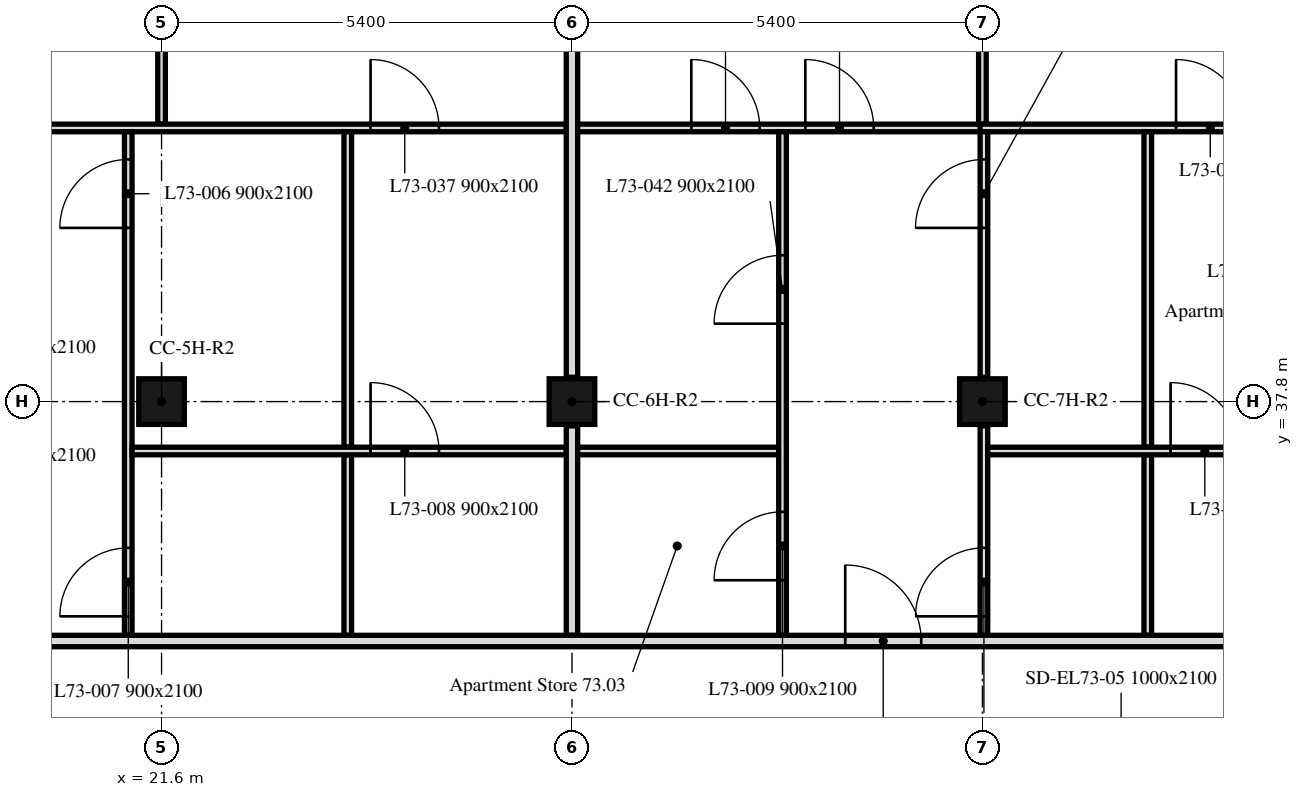
"""IFC4 building model, lengths in metres.
Left out: names, types, materials, properties, quantities, classifications, styles, units other than length and angle.
Written with IfcOpenShell. Run it as: python <this file> out.ifc"""

import sys

from ifc_helpers import new_model, si_unit, direction, frame, frame_2d, origin, origin_2d, place, context, subcontext, project, spatial, rectangle, extrude, element, fill, save


model = new_model("IFC4")
c1 = context("Model", 3, precision=1e-05, world=origin(), true_north=direction((0.0, 1.0)))
c2 = subcontext(c1, "Body", "Model", "MODEL_VIEW")
j1 = project(units=[si_unit("LENGTHUNIT", "METRE"), si_unit("PLANEANGLEUNIT", "RADIAN")], contexts=[c1])
p1 = place(None, origin())
s1 = spatial("IfcSite", under=j1, at=p1, CompositionType="ELEMENT")
p2 = place(p1, origin())
s2 = spatial("IfcBuilding", under=s1, at=p2, CompositionType="ELEMENT")
p3 = place(p2, frame((0.0, 0.0, 295.0)))
s3 = spatial("IfcBuildingStorey", under=s2, at=p3, CompositionType="ELEMENT", Elevation=295.0)
for number, where, z_axis, x_axis in (
    (1, (21.6, 37.8, 0.0), (0.0, 0.0, 1.0), (1.0, 0.0, 0.0)),
    (2, (27.0, 37.8, 0.0), (0.0, 0.0, 1.0), (1.0, 0.0, 0.0)),
    (3, (32.4, 37.8, 0.0), (0.0, 0.0, 1.0), (1.0, 0.0, 0.0)),
):
    element("IfcColumn", number, at=place(p3, frame(where, z_axis=z_axis, x_axis=x_axis)), inside=s3, PredefinedType="COLUMN", context=c2, shape_type="SweptSolid", body=[
        extrude(rectangle(XDim=0.6, YDim=0.6, at=origin_2d()), origin(), (0.0, 0.0, 1.0), 3.0),
    ])
p4 = place(p3, frame((21.6, 41.45, 0.0), z_axis=(0.0, 0.0, 1.0), x_axis=(0.0, 1.0, 0.0)))
e4 = element("IfcWall", 4, at=p4, inside=s3, PredefinedType="PARTITIONING", context=c2, shape_type="SweptSolid", body=[
    extrude(rectangle(XDim=1.43, YDim=0.1, at=frame_2d((0.715, 0.0))), origin(), (0.0, 0.0, 1.0), 2.4),
])
p5 = place(p3, frame((16.275, 41.4, 0.0), z_axis=(0.0, 0.0, 1.0), x_axis=(1.0, 0.0, 0.0)))
e5 = element("IfcWall", 5, at=p5, inside=s3, PredefinedType="PARTITIONING", context=c2, shape_type="SweptSolid", body=[
    extrude(rectangle(XDim=10.65, YDim=0.1, at=frame_2d((5.325, 0.0))), origin(), (0.0, 0.0, 1.0), 2.4),
])
p6 = place(p5, frame((0.937, 0.0, 0.0)))
e6 = element("IfcOpeningElement", 6, at=p6, cuts=e5, PredefinedType="OPENING", context=c2, shape_type="SweptSolid", body=[
    extrude(rectangle(XDim=0.9, YDim=2.1, at=frame_2d((0.45, 1.05))), frame((0.0, 0.05, 0.0), z_axis=(0.0, -1.0, 0.0), x_axis=(1.0, 0.0, 0.0)), (0.0, 0.0, 1.0), 0.1),
])
p7 = place(p5, frame((8.075, 0.0, 0.0)))
e7 = element("IfcOpeningElement", 7, at=p7, cuts=e5, PredefinedType="OPENING", context=c2, shape_type="SweptSolid", body=[
    extrude(rectangle(XDim=0.9, YDim=2.1, at=frame_2d((0.45, 1.05))), frame((0.0, 0.05, 0.0), z_axis=(0.0, -1.0, 0.0), x_axis=(1.0, 0.0, 0.0)), (0.0, 0.0, 1.0), 0.1),
])
p8 = place(p5, frame((2.437, 0.0, 0.0)))
e8 = element("IfcOpeningElement", 8, at=p8, cuts=e5, PredefinedType="OPENING", context=c2, shape_type="SweptSolid", body=[
    extrude(rectangle(XDim=0.9, YDim=2.1, at=frame_2d((0.45, 1.05))), frame((0.0, 0.05, 0.0), z_axis=(0.0, -1.0, 0.0), x_axis=(1.0, 0.0, 0.0)), (0.0, 0.0, 1.0), 0.1),
])
p9 = place(p3, frame((21.162, 34.725, 0.0), z_axis=(0.0, 0.0, 1.0), x_axis=(0.0, 1.0, 0.0)))
e9 = element("IfcWall", 9, at=p9, inside=s3, PredefinedType="PARTITIONING", context=c2, shape_type="SweptSolid", body=[
    extrude(rectangle(XDim=6.625, YDim=0.1, at=frame_2d((3.312, 0.0))), origin(), (0.0, 0.0, 1.0), 3.0),
])
p10 = place(p9, frame((5.36, 0.0, 0.0)))
e10 = element("IfcOpeningElement", 10, at=p10, cuts=e9, PredefinedType="OPENING", context=c2, shape_type="SweptSolid", body=[
    extrude(rectangle(XDim=0.9, YDim=2.1, at=frame_2d((0.45, 1.05))), frame((0.0, 0.05, 0.0), z_axis=(0.0, -1.0, 0.0), x_axis=(1.0, 0.0, 0.0)), (0.0, 0.0, 1.0), 0.1),
])
p11 = place(p9, frame((0.25, 0.0, 0.0)))
e11 = element("IfcOpeningElement", 11, at=p11, cuts=e9, PredefinedType="OPENING", context=c2, shape_type="SweptSolid", body=[
    extrude(rectangle(XDim=0.9, YDim=2.1, at=frame_2d((0.45, 1.05))), frame((0.0, 0.05, 0.0), z_axis=(0.0, -1.0, 0.0), x_axis=(1.0, 0.0, 0.0)), (0.0, 0.0, 1.0), 0.1),
])
p12 = place(p3, frame((24.05, 37.2, 0.0), z_axis=(0.0, 0.0, 1.0), x_axis=(0.0, 1.0, 0.0)))
e12 = element("IfcWall", 12, at=p12, inside=s3, PredefinedType="PARTITIONING", context=c2, shape_type="SweptSolid", body=[
    extrude(rectangle(XDim=4.15, YDim=0.1, at=frame_2d((2.075, 0.0))), origin(), (0.0, 0.0, 1.0), 3.0),
])
p13 = place(p3, frame((24.05, 34.725, 0.0), z_axis=(0.0, 0.0, 1.0), x_axis=(0.0, 1.0, 0.0)))
e13 = element("IfcWall", 13, at=p13, inside=s3, PredefinedType="PARTITIONING", context=c2, shape_type="SweptSolid", body=[
    extrude(rectangle(XDim=2.375, YDim=0.1, at=frame_2d((1.188, 0.0))), origin(), (0.0, 0.0, 1.0), 3.0),
])
p14 = place(p3, frame((21.212, 37.15, 0.0), z_axis=(0.0, 0.0, 1.0), x_axis=(1.0, 0.0, 0.0)))
e14 = element("IfcWall", 14, at=p14, inside=s3, PredefinedType="PARTITIONING", context=c2, shape_type="SweptSolid", body=[
    extrude(rectangle(XDim=5.713, YDim=0.1, at=frame_2d((2.856, 0.0))), origin(), (0.0, 0.0, 1.0), 2.4),
])
p15 = place(p14, frame((3.138, 0.0, 0.0)))
e15 = element("IfcOpeningElement", 15, at=p15, cuts=e14, PredefinedType="OPENING", context=c2, shape_type="SweptSolid", body=[
    extrude(rectangle(XDim=0.9, YDim=2.1, at=frame_2d((0.45, 1.05))), frame((0.0, 0.05, 0.0), z_axis=(0.0, -1.0, 0.0), x_axis=(1.0, 0.0, 0.0)), (0.0, 0.0, 1.0), 0.1),
])
p16 = place(p3, frame((27.0, 38.12, 0.0), z_axis=(0.0, 0.0, 1.0), x_axis=(0.0, 1.0, 0.0)))
e16 = element("IfcWall", 16, at=p16, inside=s3, PredefinedType="PARTITIONING", context=c2, shape_type="SweptSolid", body=[
    extrude(rectangle(XDim=4.76, YDim=0.15, at=frame_2d((2.38, 0.0))), origin(), (0.0, 0.0, 1.0), 2.4),
])
p17 = place(p3, frame((27.0, 34.725, 0.0), z_axis=(0.0, 0.0, 1.0), x_axis=(0.0, 1.0, 0.0)))
e17 = element("IfcWall", 17, at=p17, inside=s3, PredefinedType="PARTITIONING", context=c2, shape_type="SweptSolid", body=[
    extrude(rectangle(XDim=2.755, YDim=0.15, at=frame_2d((1.377, 0.0))), origin(), (0.0, 0.0, 1.0), 2.4),
])
p18 = place(p3, frame((27.075, 41.4, 0.0), z_axis=(0.0, 0.0, 1.0), x_axis=(1.0, 0.0, 0.0)))
e18 = element("IfcWall", 18, at=p18, inside=s3, PredefinedType="PARTITIONING", context=c2, shape_type="SweptSolid", body=[
    extrude(rectangle(XDim=5.375, YDim=0.1, at=frame_2d((2.688, 0.0))), origin(), (0.0, 0.0, 1.0), 3.0),
])
p19 = place(p18, frame((1.495, 0.0, 0.0)))
e19 = element("IfcOpeningElement", 19, at=p19, cuts=e18, PredefinedType="OPENING", context=c2, shape_type="SweptSolid", body=[
    extrude(rectangle(XDim=0.9, YDim=2.1, at=frame_2d((0.45, 1.05))), frame((0.0, 0.05, 0.0), z_axis=(0.0, -1.0, 0.0), x_axis=(1.0, 0.0, 0.0)), (0.0, 0.0, 1.0), 0.1),
])
p20 = place(p18, frame((2.995, 0.0, 0.0)))
e20 = element("IfcOpeningElement", 20, at=p20, cuts=e18, PredefinedType="OPENING", context=c2, shape_type="SweptSolid", body=[
    extrude(rectangle(XDim=0.9, YDim=2.1, at=frame_2d((0.45, 1.05))), frame((0.0, 0.05, 0.0), z_axis=(0.0, -1.0, 0.0), x_axis=(1.0, 0.0, 0.0)), (0.0, 0.0, 1.0), 0.1),
])
p21 = place(p3, frame((32.4, 41.45, 0.0), z_axis=(0.0, 0.0, 1.0), x_axis=(0.0, 1.0, 0.0)))
e21 = element("IfcWall", 21, at=p21, inside=s3, PredefinedType="PARTITIONING", context=c2, shape_type="SweptSolid", body=[
    extrude(rectangle(XDim=1.43, YDim=0.1, at=frame_2d((0.715, 0.0))), origin(), (0.0, 0.0, 1.0), 2.4),
])
p22 = place(p3, frame((32.37, 41.4, 0.0), z_axis=(0.0, 0.0, 1.0), x_axis=(1.0, 0.0, 0.0)))
e22 = element("IfcWall", 22, at=p22, inside=s3, PredefinedType="PARTITIONING", context=c2, shape_type="SweptSolid", body=[
    extrude(rectangle(XDim=5.355, YDim=0.1, at=frame_2d((2.677, 0.0))), origin(), (0.0, 0.0, 1.0), 3.0),
])
p23 = place(p22, frame((2.578, 0.0, 0.0)))
e23 = element("IfcOpeningElement", 23, at=p23, cuts=e22, PredefinedType="OPENING", context=c2, shape_type="SweptSolid", body=[
    extrude(rectangle(XDim=0.9, YDim=2.1, at=frame_2d((0.45, 1.05))), frame((0.0, 0.05, 0.0), z_axis=(0.0, -1.0, 0.0), x_axis=(1.0, 0.0, 0.0)), (0.0, 0.0, 1.0), 0.1),
])
p24 = place(p3, frame((27.075, 37.15, 0.0), z_axis=(0.0, 0.0, 1.0), x_axis=(1.0, 0.0, 0.0)))
e24 = element("IfcWall", 24, at=p24, inside=s3, PredefinedType="PARTITIONING", context=c2, shape_type="SweptSolid", body=[
    extrude(rectangle(XDim=2.645, YDim=0.1, at=frame_2d((1.323, 0.0))), origin(), (0.0, 0.0, 1.0), 3.0),
])
p25 = place(p3, frame((29.77, 34.725, 0.0), z_axis=(0.0, 0.0, 1.0), x_axis=(0.0, 1.0, 0.0)))
e25 = element("IfcWall", 25, at=p25, inside=s3, PredefinedType="PARTITIONING", context=c2, shape_type="SweptSolid", body=[
    extrude(rectangle(XDim=6.625, YDim=0.1, at=frame_2d((3.312, 0.0))), origin(), (0.0, 0.0, 1.0), 3.0),
])
p26 = place(p25, frame((0.725, 0.0, 0.0)))
e26 = element("IfcOpeningElement", 26, at=p26, cuts=e25, PredefinedType="OPENING", context=c2, shape_type="SweptSolid", body=[
    extrude(rectangle(XDim=0.9, YDim=2.1, at=frame_2d((0.45, 1.05))), frame((0.0, 0.05, 0.0), z_axis=(0.0, -1.0, 0.0), x_axis=(1.0, 0.0, 0.0)), (0.0, 0.0, 1.0), 0.1),
])
p27 = place(p25, frame((4.1, 0.0, 0.0)))
e27 = element("IfcOpeningElement", 27, at=p27, cuts=e25, PredefinedType="OPENING", context=c2, shape_type="SweptSolid", body=[
    extrude(rectangle(XDim=0.9, YDim=2.1, at=frame_2d((0.45, 1.05))), frame((0.0, 0.05, 0.0), z_axis=(0.0, -1.0, 0.0), x_axis=(1.0, 0.0, 0.0)), (0.0, 0.0, 1.0), 0.1),
])
p28 = place(p3, frame((32.42, 34.725, 0.0), z_axis=(0.0, 0.0, 1.0), x_axis=(0.0, 1.0, 0.0)))
e28 = element("IfcWall", 28, at=p28, inside=s3, PredefinedType="PARTITIONING", context=c2, shape_type="SweptSolid", body=[
    extrude(rectangle(XDim=2.755, YDim=0.1, at=frame_2d((1.377, 0.0))), origin(), (0.0, 0.0, 1.0), 2.4),
])
p29 = place(p28, frame((0.25, 0.0, 0.0)))
e29 = element("IfcOpeningElement", 29, at=p29, cuts=e28, PredefinedType="OPENING", context=c2, shape_type="SweptSolid", body=[
    extrude(rectangle(XDim=0.9, YDim=2.1, at=frame_2d((0.45, 1.05))), frame((0.0, 0.05, 0.0), z_axis=(0.0, -1.0, 0.0), x_axis=(1.0, 0.0, 0.0)), (0.0, 0.0, 1.0), 0.1),
])
p30 = place(p3, frame((32.42, 38.12, 0.0), z_axis=(0.0, 0.0, 1.0), x_axis=(0.0, 1.0, 0.0)))
e30 = element("IfcWall", 30, at=p30, inside=s3, PredefinedType="PARTITIONING", context=c2, shape_type="SweptSolid", body=[
    extrude(rectangle(XDim=3.23, YDim=0.1, at=frame_2d((1.615, 0.0))), origin(), (0.0, 0.0, 1.0), 2.4),
])
p31 = place(p30, frame((1.965, 0.0, 0.0)))
e31 = element("IfcOpeningElement", 31, at=p31, cuts=e30, PredefinedType="OPENING", context=c2, shape_type="SweptSolid", body=[
    extrude(rectangle(XDim=0.9, YDim=2.1, at=frame_2d((0.45, 1.05))), frame((0.0, 0.05, 0.0), z_axis=(0.0, -1.0, 0.0), x_axis=(1.0, 0.0, 0.0)), (0.0, 0.0, 1.0), 0.1),
])
p32 = place(p3, frame((34.576, 37.2, 0.0), z_axis=(0.0, 0.0, 1.0), x_axis=(0.0, 1.0, 0.0)))
e32 = element("IfcWall", 32, at=p32, inside=s3, PredefinedType="PARTITIONING", context=c2, shape_type="SweptSolid", body=[
    extrude(rectangle(XDim=4.15, YDim=0.1, at=frame_2d((2.075, 0.0))), origin(), (0.0, 0.0, 1.0), 2.4),
])
p33 = place(p3, frame((34.576, 34.725, 0.0), z_axis=(0.0, 0.0, 1.0), x_axis=(0.0, 1.0, 0.0)))
e33 = element("IfcWall", 33, at=p33, inside=s3, PredefinedType="PARTITIONING", context=c2, shape_type="SweptSolid", body=[
    extrude(rectangle(XDim=2.375, YDim=0.1, at=frame_2d((1.188, 0.0))), origin(), (0.0, 0.0, 1.0), 3.0),
])
p34 = place(p3, frame((32.47, 37.15, 0.0), z_axis=(0.0, 0.0, 1.0), x_axis=(1.0, 0.0, 0.0)))
e34 = element("IfcWall", 34, at=p34, inside=s3, PredefinedType="PARTITIONING", context=c2, shape_type="SweptSolid", body=[
    extrude(rectangle(XDim=5.255, YDim=0.1, at=frame_2d((2.627, 0.0))), origin(), (0.0, 0.0, 1.0), 3.0),
])
p35 = place(p34, frame((2.406, 0.0, 0.0)))
e35 = element("IfcOpeningElement", 35, at=p35, cuts=e34, PredefinedType="OPENING", context=c2, shape_type="SweptSolid", body=[
    extrude(rectangle(XDim=0.9, YDim=2.1, at=frame_2d((0.45, 1.05))), frame((0.0, 0.05, 0.0), z_axis=(0.0, -1.0, 0.0), x_axis=(1.0, 0.0, 0.0)), (0.0, 0.0, 1.0), 0.1),
])
p36 = place(p3, frame((6.151, 34.65, 0.0), z_axis=(0.0, 0.0, 1.0), x_axis=(1.0, 0.0, 0.0)))
e36 = element("IfcWall", 36, at=p36, inside=s3, PredefinedType="PARTITIONING", context=c2, shape_type="SweptSolid", body=[
    extrude(rectangle(XDim=41.698, YDim=0.15, at=frame_2d((20.849, 0.0))), origin(), (0.0, 0.0, 1.0), 2.4),
])
p37 = place(p36, frame((2.969, 0.0, 0.0)))
e37 = element("IfcOpeningElement", 37, at=p37, cuts=e36, PredefinedType="OPENING", context=c2, shape_type="SweptSolid", body=[
    extrude(rectangle(XDim=1.0, YDim=2.1, at=frame_2d((0.5, 1.05))), frame((0.0, 0.075, 0.0), z_axis=(0.0, -1.0, 0.0), x_axis=(1.0, 0.0, 0.0)), (0.0, 0.0, 1.0), 0.15),
])
p38 = place(p36, frame((12.944, 0.0, 0.0)))
e38 = element("IfcOpeningElement", 38, at=p38, cuts=e36, PredefinedType="OPENING", context=c2, shape_type="SweptSolid", body=[
    extrude(rectangle(XDim=1.0, YDim=2.1, at=frame_2d((0.5, 1.05))), frame((0.0, 0.075, 0.0), z_axis=(0.0, -1.0, 0.0), x_axis=(1.0, 0.0, 0.0)), (0.0, 0.0, 1.0), 0.15),
])
p39 = place(p36, frame((24.444, 0.0, 0.0)))
e39 = element("IfcOpeningElement", 39, at=p39, cuts=e36, PredefinedType="OPENING", context=c2, shape_type="SweptSolid", body=[
    extrude(rectangle(XDim=1.0, YDim=2.1, at=frame_2d((0.5, 1.05))), frame((0.0, 0.075, 0.0), z_axis=(0.0, -1.0, 0.0), x_axis=(1.0, 0.0, 0.0)), (0.0, 0.0, 1.0), 0.15),
])
p40 = place(p36, frame((34.964, 0.0, 0.0)))
e40 = element("IfcOpeningElement", 40, at=p40, cuts=e36, PredefinedType="OPENING", context=c2, shape_type="SweptSolid", body=[
    extrude(rectangle(XDim=1.0, YDim=2.1, at=frame_2d((0.5, 1.05))), frame((0.0, 0.075, 0.0), z_axis=(0.0, -1.0, 0.0), x_axis=(1.0, 0.0, 0.0)), (0.0, 0.0, 1.0), 0.15),
])
p41 = place(p10, origin())
e41 = element("IfcDoor", 41, at=p41, inside=s3, OperationType="SINGLE_SWING_LEFT", PredefinedType="DOOR", context=c2, shape_type="SweptSolid", body=[
    extrude(rectangle(XDim=0.9, YDim=2.1, at=frame_2d((0.45, 1.05))), frame((0.0, 0.025, 0.0), z_axis=(0.0, -1.0, 0.0), x_axis=(1.0, 0.0, 0.0)), (0.0, 0.0, 1.0), 0.05),
])
fill(e10, e41)
p42 = place(p11, origin())
e42 = element("IfcDoor", 42, at=p42, inside=s3, OperationType="SINGLE_SWING_LEFT", PredefinedType="DOOR", context=c2, shape_type="SweptSolid", body=[
    extrude(rectangle(XDim=0.9, YDim=2.1, at=frame_2d((0.45, 1.05))), frame((0.0, 0.025, 0.0), z_axis=(0.0, -1.0, 0.0), x_axis=(1.0, 0.0, 0.0)), (0.0, 0.0, 1.0), 0.05),
])
fill(e11, e42)
p43 = place(p15, origin())
e43 = element("IfcDoor", 43, at=p43, inside=s3, OperationType="SINGLE_SWING_LEFT", PredefinedType="DOOR", context=c2, shape_type="SweptSolid", body=[
    extrude(rectangle(XDim=0.9, YDim=2.1, at=frame_2d((0.45, 1.05))), frame((0.0, 0.025, 0.0), z_axis=(0.0, -1.0, 0.0), x_axis=(1.0, 0.0, 0.0)), (0.0, 0.0, 1.0), 0.05),
])
fill(e15, e43)
p44 = place(p26, origin())
e44 = element("IfcDoor", 44, at=p44, inside=s3, OperationType="SINGLE_SWING_LEFT", PredefinedType="DOOR", context=c2, shape_type="SweptSolid", body=[
    extrude(rectangle(XDim=0.9, YDim=2.1, at=frame_2d((0.45, 1.05))), frame((0.0, 0.025, 0.0), z_axis=(0.0, -1.0, 0.0), x_axis=(1.0, 0.0, 0.0)), (0.0, 0.0, 1.0), 0.05),
])
fill(e26, e44)
p45 = place(p31, origin())
e45 = element("IfcDoor", 45, at=p45, inside=s3, OperationType="SINGLE_SWING_RIGHT", PredefinedType="DOOR", context=c2, shape_type="SweptSolid", body=[
    extrude(rectangle(XDim=0.9, YDim=2.1, at=frame_2d((0.45, 1.05))), frame((0.0, 0.025, 0.0), z_axis=(0.0, -1.0, 0.0), x_axis=(1.0, 0.0, 0.0)), (0.0, 0.0, 1.0), 0.05),
])
fill(e31, e45)
p46 = place(p29, origin())
e46 = element("IfcDoor", 46, at=p46, inside=s3, OperationType="SINGLE_SWING_RIGHT", PredefinedType="DOOR", context=c2, shape_type="SweptSolid", body=[
    extrude(rectangle(XDim=0.9, YDim=2.1, at=frame_2d((0.45, 1.05))), frame((0.0, 0.025, 0.0), z_axis=(0.0, -1.0, 0.0), x_axis=(1.0, 0.0, 0.0)), (0.0, 0.0, 1.0), 0.05),
])
fill(e29, e46)
p47 = place(p35, origin())
e47 = element("IfcDoor", 47, at=p47, inside=s3, OperationType="SINGLE_SWING_RIGHT", PredefinedType="DOOR", context=c2, shape_type="SweptSolid", body=[
    extrude(rectangle(XDim=0.9, YDim=2.1, at=frame_2d((0.45, 1.05))), frame((0.0, 0.025, 0.0), z_axis=(0.0, -1.0, 0.0), x_axis=(1.0, 0.0, 0.0)), (0.0, 0.0, 1.0), 0.05),
])
fill(e35, e47)
p48 = place(p7, origin())
e48 = element("IfcDoor", 48, at=p48, inside=s3, OperationType="SINGLE_SWING_LEFT", PredefinedType="DOOR", context=c2, shape_type="SweptSolid", body=[
    extrude(rectangle(XDim=0.9, YDim=2.1, at=frame_2d((0.45, 1.05))), frame((0.0, 0.025, 0.0), z_axis=(0.0, -1.0, 0.0), x_axis=(1.0, 0.0, 0.0)), (0.0, 0.0, 1.0), 0.05),
])
fill(e7, e48)
p49 = place(p19, origin())
e49 = element("IfcDoor", 49, at=p49, inside=s3, OperationType="SINGLE_SWING_RIGHT", PredefinedType="DOOR", context=c2, shape_type="SweptSolid", body=[
    extrude(rectangle(XDim=0.9, YDim=2.1, at=frame_2d((0.45, 1.05))), frame((0.0, 0.025, 0.0), z_axis=(0.0, -1.0, 0.0), x_axis=(1.0, 0.0, 0.0)), (0.0, 0.0, 1.0), 0.05),
])
fill(e19, e49)
p50 = place(p23, origin())
e50 = element("IfcDoor", 50, at=p50, inside=s3, OperationType="SINGLE_SWING_LEFT", PredefinedType="DOOR", context=c2, shape_type="SweptSolid", body=[
    extrude(rectangle(XDim=0.9, YDim=2.1, at=frame_2d((0.45, 1.05))), frame((0.0, 0.025, 0.0), z_axis=(0.0, -1.0, 0.0), x_axis=(1.0, 0.0, 0.0)), (0.0, 0.0, 1.0), 0.05),
])
fill(e23, e50)
p51 = place(p27, origin())
e51 = element("IfcDoor", 51, at=p51, inside=s3, OperationType="SINGLE_SWING_RIGHT", PredefinedType="DOOR", context=c2, shape_type="SweptSolid", body=[
    extrude(rectangle(XDim=0.9, YDim=2.1, at=frame_2d((0.45, 1.05))), frame((0.0, 0.025, 0.0), z_axis=(0.0, -1.0, 0.0), x_axis=(1.0, 0.0, 0.0)), (0.0, 0.0, 1.0), 0.05),
])
fill(e27, e51)
p52 = place(p20, origin())
e52 = element("IfcDoor", 52, at=p52, inside=s3, OperationType="SINGLE_SWING_LEFT", PredefinedType="DOOR", context=c2, shape_type="SweptSolid", body=[
    extrude(rectangle(XDim=0.9, YDim=2.1, at=frame_2d((0.45, 1.05))), frame((0.0, 0.025, 0.0), z_axis=(0.0, -1.0, 0.0), x_axis=(1.0, 0.0, 0.0)), (0.0, 0.0, 1.0), 0.05),
])
fill(e20, e52)
p53 = place(p39, origin())
e53 = element("IfcDoor", 53, at=p53, inside=s3, OperationType="SINGLE_SWING_LEFT", PredefinedType="DOOR", context=c2, shape_type="SweptSolid", body=[
    extrude(rectangle(XDim=1.0, YDim=2.1, at=frame_2d((0.5, 1.05))), frame((0.0, 0.025, 0.0), z_axis=(0.0, -1.0, 0.0), x_axis=(1.0, 0.0, 0.0)), (0.0, 0.0, 1.0), 0.05),
])
fill(e39, e53)
save(model, sys.argv[1])
